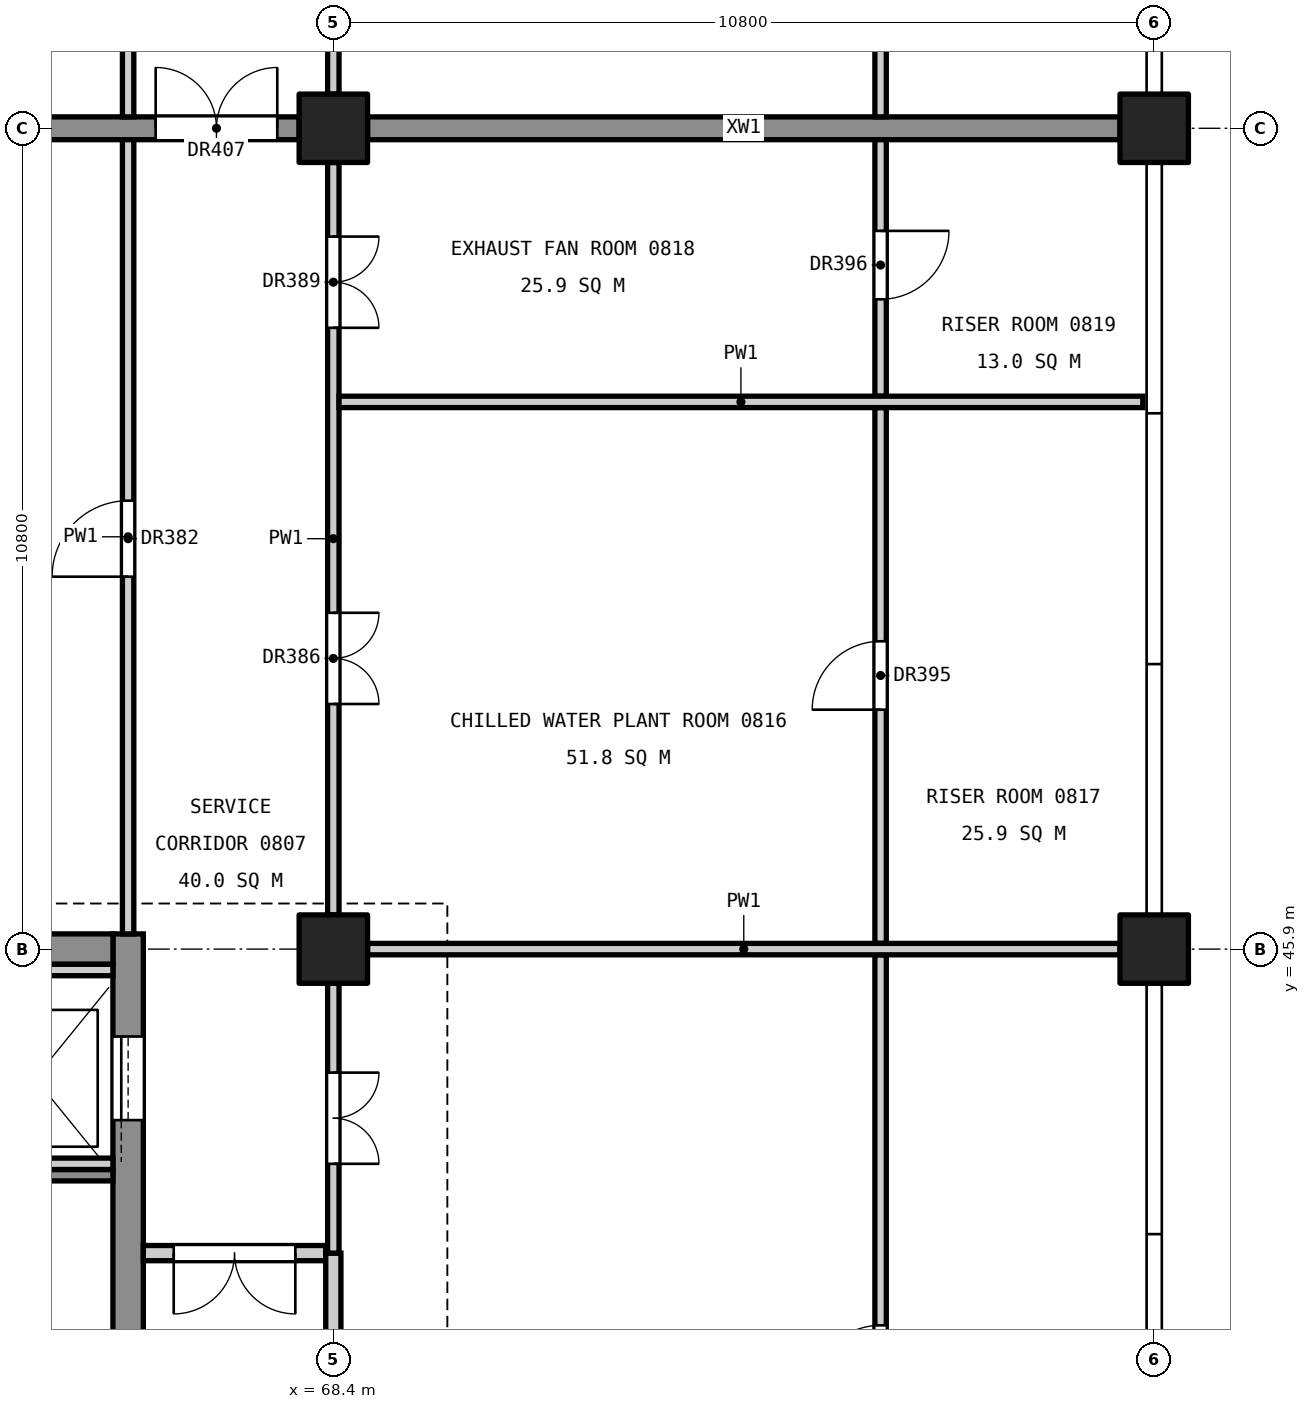
"""IFC4 building model, lengths in metres.
Left out: names, types, materials, properties, quantities, classifications, styles, units other than length and angle.
Written with IfcOpenShell. Run it as: python <this file> out.ifc"""

import sys

from ifc_helpers import new_model, si_unit, direction, frame, frame_2d, origin, origin_2d, place, context, subcontext, project, spatial, rectangle, extrude, element, fill, save


model = new_model("IFC4")
c1 = context("Model", 3, precision=1e-05, world=origin(), true_north=direction((0.0, 1.0)))
c2 = subcontext(c1, "Body", "Model", "MODEL_VIEW")
j1 = project(units=[si_unit("LENGTHUNIT", "METRE"), si_unit("PLANEANGLEUNIT", "RADIAN")], contexts=[c1])
p1 = place(None, origin())
s1 = spatial("IfcSite", under=j1, at=p1, CompositionType="ELEMENT")
p2 = place(p1, origin())
s2 = spatial("IfcBuilding", under=s1, at=p2, CompositionType="ELEMENT")
p3 = place(p2, frame((0.0, 0.0, 41.4)))
s3 = spatial("IfcBuildingStorey", under=s2, at=p3, CompositionType="ELEMENT", Elevation=41.4)
for number, where, z_axis, x_axis in (
    (1, (68.4, 45.9, 0.0), (0.0, 0.0, 1.0), (1.0, 0.0, 0.0)),
    (2, (68.4, 56.7, 0.0), (0.0, 0.0, 1.0), (1.0, 0.0, 0.0)),
    (3, (79.2, 45.9, 0.0), (0.0, 0.0, 1.0), (1.0, 0.0, 0.0)),
    (4, (79.2, 56.7, 0.0), (0.0, 0.0, 1.0), (1.0, 0.0, 0.0)),
):
    element("IfcColumn", number, at=place(p3, frame(where, z_axis=z_axis, x_axis=x_axis)), inside=s3, PredefinedType="COLUMN", context=c2, shape_type="SweptSolid", body=[
        extrude(rectangle(XDim=0.9, YDim=0.9, at=origin_2d()), origin(), (0.0, 0.0, 1.0), 4.8),
    ])
p4 = place(p3, frame((65.7, 34.9, 0.0), z_axis=(0.0, 0.0, 1.0), x_axis=(0.0, 1.0, 0.0)))
e5 = element("IfcWall", 5, at=p4, inside=s3, PredefinedType="SHEAR", context=c2, shape_type="SweptSolid", body=[
    extrude(rectangle(XDim=11.2, YDim=0.4, at=frame_2d((5.6, 0.0))), origin(), (0.0, 0.0, 1.0), 4.55),
])
p5 = place(p4, frame((0.5, 0.0, 0.0)))
e6 = element("IfcOpeningElement", 6, at=p5, cuts=e5, PredefinedType="OPENING", context=c2, shape_type="SweptSolid", body=[
    extrude(rectangle(XDim=1.4, YDim=2.1, at=frame_2d((0.7, 1.05))), frame((0.0, 0.21, 0.0), z_axis=(0.0, -1.0, 0.0), x_axis=(1.0, 0.0, 0.0)), (0.0, 0.0, 1.0), 0.42),
])
p6 = place(p4, frame((8.75, 0.0, 0.0)))
e7 = element("IfcOpeningElement", 7, at=p6, cuts=e5, PredefinedType="OPENING", context=c2, shape_type="SweptSolid", body=[
    extrude(rectangle(XDim=1.1, YDim=2.1, at=frame_2d((0.55, 1.05))), frame((0.0, 0.21, 0.0), z_axis=(0.0, -1.0, 0.0), x_axis=(1.0, 0.0, 0.0)), (0.0, 0.0, 1.0), 0.42),
])
p7 = place(p3, frame((61.4, 45.9, 0.0), z_axis=(0.0, 0.0, 1.0), x_axis=(1.0, 0.0, 0.0)))
e8 = element("IfcWall", 8, at=p7, inside=s3, PredefinedType="SHEAR", context=c2, shape_type="SweptSolid", body=[
    extrude(rectangle(XDim=4.1, YDim=0.4, at=frame_2d((2.05, 0.0))), origin(), (0.0, 0.0, 1.0), 4.55),
])
p8 = place(p3, frame((61.65, 56.7, 0.0), z_axis=(0.0, 0.0, 1.0), x_axis=(1.0, 0.0, 0.0)))
e9 = element("IfcWall", 9, at=p8, inside=s3, PredefinedType="SHEAR", context=c2, shape_type="SweptSolid", body=[
    extrude(rectangle(XDim=6.3, YDim=0.3, at=frame_2d((3.15, 0.0))), origin(), (0.0, 0.0, 1.0), 4.55),
])
p9 = place(p8, frame((4.413, 0.0, 0.0)))
e10 = element("IfcOpeningElement", 10, at=p9, cuts=e9, PredefinedType="OPENING", context=c2, shape_type="SweptSolid", body=[
    extrude(rectangle(XDim=1.6, YDim=2.1, at=frame_2d((0.8, 1.05))), frame((0.0, 0.16, 0.0), z_axis=(0.0, -1.0, 0.0), x_axis=(1.0, 0.0, 0.0)), (0.0, 0.0, 1.0), 0.32),
])
p10 = place(p3, frame((68.85, 56.7, 0.0), z_axis=(0.0, 0.0, 1.0), x_axis=(1.0, 0.0, 0.0)))
e11 = element("IfcWall", 11, at=p10, inside=s3, PredefinedType="SHEAR", context=c2, shape_type="SweptSolid", body=[
    extrude(rectangle(XDim=9.9, YDim=0.3, at=frame_2d((4.95, 0.0))), origin(), (0.0, 0.0, 1.0), 4.55),
])
p11 = place(p3, frame((61.4, 42.925, 0.0), z_axis=(0.0, 0.0, 1.0), x_axis=(1.0, 0.0, 0.0)))
e12 = element("IfcWall", 12, at=p11, inside=s3, PredefinedType="SOLIDWALL", context=c2, shape_type="SweptSolid", body=[
    extrude(rectangle(XDim=4.1, YDim=0.15, at=frame_2d((2.05, 0.0))), origin(), (0.0, 0.0, 1.0), 4.55),
])
for number, where, z_axis, x_axis in (
    (13, (63.65, 43.075, 0.0), (0.0, 0.0, 1.0), (1.0, 0.0, 0.0)),
    (14, (63.65, 45.625, 0.0), (0.0, 0.0, 1.0), (1.0, 0.0, 0.0)),
):
    element("IfcWall", number, at=place(p3, frame(where, z_axis=z_axis, x_axis=x_axis)), inside=s3, PredefinedType="SOLIDWALL", context=c2, shape_type="SweptSolid", body=[
        extrude(rectangle(XDim=1.85, YDim=0.15, at=frame_2d((0.925, 0.0))), origin(), (0.0, 0.0, 1.0), 4.8),
    ])
p12 = place(p3, frame((65.7, 46.1, 0.0), z_axis=(0.0, 0.0, 1.0), x_axis=(0.0, 1.0, 0.0)))
e15 = element("IfcWall", 15, at=p12, inside=s3, PredefinedType="PARTITIONING", context=c2, shape_type="SweptSolid", body=[
    extrude(rectangle(XDim=10.45, YDim=0.15, at=frame_2d((5.225, 0.0))), origin(), (0.0, 0.0, 1.0), 3.55),
])
p13 = place(p12, frame((4.7, 0.0, 0.0)))
e16 = element("IfcOpeningElement", 16, at=p13, cuts=e15, PredefinedType="OPENING", context=c2, shape_type="SweptSolid", body=[
    extrude(rectangle(XDim=1.0, YDim=2.1, at=frame_2d((0.5, 1.05))), frame((0.0, 0.085, 0.0), z_axis=(0.0, -1.0, 0.0), x_axis=(1.0, 0.0, 0.0)), (0.0, 0.0, 1.0), 0.17),
])
p14 = place(p3, frame((65.7, 56.85, 0.0), z_axis=(0.0, 0.0, 1.0), x_axis=(0.0, 1.0, 0.0)))
e17 = element("IfcWall", 17, at=p14, inside=s3, PredefinedType="PARTITIONING", context=c2, shape_type="SweptSolid", body=[
    extrude(rectangle(XDim=3.25, YDim=0.15, at=frame_2d((1.625, 0.0))), origin(), (0.0, 0.0, 1.0), 3.55),
])
p15 = place(p14, frame((1.15, 0.0, 0.0)))
e18 = element("IfcOpeningElement", 18, at=p15, cuts=e17, PredefinedType="OPENING", context=c2, shape_type="SweptSolid", body=[
    extrude(rectangle(XDim=1.0, YDim=2.1, at=frame_2d((0.5, 1.05))), frame((0.0, 0.085, 0.0), z_axis=(0.0, -1.0, 0.0), x_axis=(1.0, 0.0, 0.0)), (0.0, 0.0, 1.0), 0.17),
])
p16 = place(p3, frame((65.9, 41.9, 0.0), z_axis=(0.0, 0.0, 1.0), x_axis=(1.0, 0.0, 0.0)))
e19 = element("IfcWall", 19, at=p16, inside=s3, PredefinedType="PARTITIONING", context=c2, shape_type="SweptSolid", body=[
    extrude(rectangle(XDim=2.4, YDim=0.2, at=frame_2d((1.2, 0.0))), origin(), (0.0, 0.0, 1.0), 3.55),
])
p17 = place(p16, frame((0.4, 0.0, 0.0)))
e20 = element("IfcOpeningElement", 20, at=p17, cuts=e19, PredefinedType="OPENING", context=c2, shape_type="SweptSolid", body=[
    extrude(rectangle(XDim=1.6, YDim=2.1, at=frame_2d((0.8, 1.05))), frame((0.0, 0.11, 0.0), z_axis=(0.0, -1.0, 0.0), x_axis=(1.0, 0.0, 0.0)), (0.0, 0.0, 1.0), 0.22),
])
p18 = place(p3, frame((68.4, 35.55, 0.0), z_axis=(0.0, 0.0, 1.0), x_axis=(0.0, 1.0, 0.0)))
e21 = element("IfcWall", 21, at=p18, inside=s3, PredefinedType="PARTITIONING", context=c2, shape_type="SweptSolid", body=[
    extrude(rectangle(XDim=6.35, YDim=0.2, at=frame_2d((3.175, 0.0))), origin(), (0.0, 0.0, 1.0), 3.55),
])
p19 = place(p3, frame((68.4, 41.9, 0.0), z_axis=(0.0, 0.0, 1.0), x_axis=(0.0, 1.0, 0.0)))
e22 = element("IfcWall", 22, at=p19, inside=s3, PredefinedType="PARTITIONING", context=c2, shape_type="SweptSolid", body=[
    extrude(rectangle(XDim=3.55, YDim=0.15, at=frame_2d((1.775, 0.0))), origin(), (0.0, 0.0, 1.0), 3.55),
])
p20 = place(p19, frame((1.175, 0.0, 0.0)))
e23 = element("IfcOpeningElement", 23, at=p20, cuts=e22, PredefinedType="OPENING", context=c2, shape_type="SweptSolid", body=[
    extrude(rectangle(XDim=1.2, YDim=2.1, at=frame_2d((0.6, 1.05))), frame((0.0, 0.085, 0.0), z_axis=(0.0, -1.0, 0.0), x_axis=(1.0, 0.0, 0.0)), (0.0, 0.0, 1.0), 0.17),
])
p21 = place(p3, frame((68.4, 46.35, 0.0), z_axis=(0.0, 0.0, 1.0), x_axis=(0.0, 1.0, 0.0)))
e24 = element("IfcWall", 24, at=p21, inside=s3, PredefinedType="PARTITIONING", context=c2, shape_type="SweptSolid", body=[
    extrude(rectangle(XDim=9.9, YDim=0.15, at=frame_2d((4.95, 0.0))), origin(), (0.0, 0.0, 1.0), 3.55),
])
p22 = place(p21, frame((2.775, 0.0, 0.0)))
e25 = element("IfcOpeningElement", 25, at=p22, cuts=e24, PredefinedType="OPENING", context=c2, shape_type="SweptSolid", body=[
    extrude(rectangle(XDim=1.2, YDim=2.1, at=frame_2d((0.6, 1.05))), frame((0.0, 0.085, 0.0), z_axis=(0.0, -1.0, 0.0), x_axis=(1.0, 0.0, 0.0)), (0.0, 0.0, 1.0), 0.17),
])
p23 = place(p21, frame((7.725, 0.0, 0.0)))
e26 = element("IfcOpeningElement", 26, at=p23, cuts=e24, PredefinedType="OPENING", context=c2, shape_type="SweptSolid", body=[
    extrude(rectangle(XDim=1.2, YDim=2.1, at=frame_2d((0.6, 1.05))), frame((0.0, 0.085, 0.0), z_axis=(0.0, -1.0, 0.0), x_axis=(1.0, 0.0, 0.0)), (0.0, 0.0, 1.0), 0.17),
])
p24 = place(p3, frame((68.4, 57.15, 0.0), z_axis=(0.0, 0.0, 1.0), x_axis=(0.0, 1.0, 0.0)))
e27 = element("IfcWall", 27, at=p24, inside=s3, PredefinedType="PARTITIONING", context=c2, shape_type="SweptSolid", body=[
    extrude(rectangle(XDim=3.15, YDim=0.15, at=frame_2d((1.575, 0.0))), origin(), (0.0, 0.0, 1.0), 3.55),
])
p25 = place(p24, frame((0.975, 0.0, 0.0)))
e28 = element("IfcOpeningElement", 28, at=p25, cuts=e27, PredefinedType="OPENING", context=c2, shape_type="SweptSolid", body=[
    extrude(rectangle(XDim=1.2, YDim=2.1, at=frame_2d((0.6, 1.05))), frame((0.0, 0.085, 0.0), z_axis=(0.0, -1.0, 0.0), x_axis=(1.0, 0.0, 0.0)), (0.0, 0.0, 1.0), 0.17),
])
p26 = place(p3, frame((75.6, 35.25, 0.0), z_axis=(0.0, 0.0, 1.0), x_axis=(0.0, 1.0, 0.0)))
e29 = element("IfcWall", 29, at=p26, inside=s3, PredefinedType="PARTITIONING", context=c2, shape_type="SweptSolid", body=[
    extrude(rectangle(XDim=10.575, YDim=0.15, at=frame_2d((5.288, 0.0))), origin(), (0.0, 0.0, 1.0), 3.55),
])
p27 = place(p26, frame((4.8, 0.0, 0.0)))
e30 = element("IfcOpeningElement", 30, at=p27, cuts=e29, PredefinedType="OPENING", context=c2, shape_type="SweptSolid", body=[
    extrude(rectangle(XDim=0.9, YDim=2.1, at=frame_2d((0.45, 1.05))), frame((0.0, 0.085, 0.0), z_axis=(0.0, -1.0, 0.0), x_axis=(1.0, 0.0, 0.0)), (0.0, 0.0, 1.0), 0.17),
])
p28 = place(p3, frame((75.6, 45.975, 0.0), z_axis=(0.0, 0.0, 1.0), x_axis=(0.0, 1.0, 0.0)))
e31 = element("IfcWall", 31, at=p28, inside=s3, PredefinedType="PARTITIONING", context=c2, shape_type="SweptSolid", body=[
    extrude(rectangle(XDim=7.05, YDim=0.15, at=frame_2d((3.525, 0.0))), origin(), (0.0, 0.0, 1.0), 3.55),
])
p29 = place(p28, frame((3.075, 0.0, 0.0)))
e32 = element("IfcOpeningElement", 32, at=p29, cuts=e31, PredefinedType="OPENING", context=c2, shape_type="SweptSolid", body=[
    extrude(rectangle(XDim=0.9, YDim=2.1, at=frame_2d((0.45, 1.05))), frame((0.0, 0.085, 0.0), z_axis=(0.0, -1.0, 0.0), x_axis=(1.0, 0.0, 0.0)), (0.0, 0.0, 1.0), 0.17),
])
p30 = place(p3, frame((75.6, 53.175, 0.0), z_axis=(0.0, 0.0, 1.0), x_axis=(0.0, 1.0, 0.0)))
e33 = element("IfcWall", 33, at=p30, inside=s3, PredefinedType="PARTITIONING", context=c2, shape_type="SweptSolid", body=[
    extrude(rectangle(XDim=3.375, YDim=0.15, at=frame_2d((1.688, 0.0))), origin(), (0.0, 0.0, 1.0), 3.55),
])
p31 = place(p30, frame((1.275, 0.0, 0.0)))
e34 = element("IfcOpeningElement", 34, at=p31, cuts=e33, PredefinedType="OPENING", context=c2, shape_type="SweptSolid", body=[
    extrude(rectangle(XDim=0.9, YDim=2.1, at=frame_2d((0.45, 1.05))), frame((0.0, 0.085, 0.0), z_axis=(0.0, -1.0, 0.0), x_axis=(1.0, 0.0, 0.0)), (0.0, 0.0, 1.0), 0.17),
])
p32 = place(p3, frame((75.6, 56.85, 0.0), z_axis=(0.0, 0.0, 1.0), x_axis=(0.0, 1.0, 0.0)))
e35 = element("IfcWall", 35, at=p32, inside=s3, PredefinedType="PARTITIONING", context=c2, shape_type="SweptSolid", body=[
    extrude(rectangle(XDim=14.175, YDim=0.15, at=frame_2d((7.087, 0.0))), origin(), (0.0, 0.0, 1.0), 3.55),
])
p33 = place(p32, frame((6.6, 0.0, 0.0)))
e36 = element("IfcOpeningElement", 36, at=p33, cuts=e35, PredefinedType="OPENING", context=c2, shape_type="SweptSolid", body=[
    extrude(rectangle(XDim=0.9, YDim=2.1, at=frame_2d((0.45, 1.05))), frame((0.0, 0.085, 0.0), z_axis=(0.0, -1.0, 0.0), x_axis=(1.0, 0.0, 0.0)), (0.0, 0.0, 1.0), 0.17),
])
p34 = place(p3, frame((68.85, 45.9, 0.0), z_axis=(0.0, 0.0, 1.0), x_axis=(1.0, 0.0, 0.0)))
e37 = element("IfcWall", 37, at=p34, inside=s3, PredefinedType="PARTITIONING", context=c2, shape_type="SweptSolid", body=[
    extrude(rectangle(XDim=9.9, YDim=0.15, at=frame_2d((4.95, 0.0))), origin(), (0.0, 0.0, 1.0), 3.85),
])
p35 = place(p3, frame((68.475, 53.1, 0.0), z_axis=(0.0, 0.0, 1.0), x_axis=(1.0, 0.0, 0.0)))
e38 = element("IfcWall", 38, at=p35, inside=s3, PredefinedType="PARTITIONING", context=c2, shape_type="SweptSolid", body=[
    extrude(rectangle(XDim=10.575, YDim=0.15, at=frame_2d((5.288, 0.0))), origin(), (0.0, 0.0, 1.0), 3.85),
])
p36 = place(p6, origin())
e39 = element("IfcDoor", 39, at=p36, inside=s3, OperationType="SLIDING_TO_LEFT", PredefinedType="DOOR", context=c2, shape_type="SweptSolid", body=[
    extrude(rectangle(XDim=1.1, YDim=2.1, at=frame_2d((0.55, 1.05))), frame((0.0, 0.025, 0.0), z_axis=(0.0, -1.0, 0.0), x_axis=(1.0, 0.0, 0.0)), (0.0, 0.0, 1.0), 0.05),
])
fill(e7, e39)
p37 = place(p13, origin())
e40 = element("IfcDoor", 40, at=p37, inside=s3, OperationType="SINGLE_SWING_LEFT", PredefinedType="DOOR", context=c2, shape_type="SweptSolid", body=[
    extrude(rectangle(XDim=1.0, YDim=2.1, at=frame_2d((0.5, 1.05))), frame((0.0, 0.025, 0.0), z_axis=(0.0, -1.0, 0.0), x_axis=(1.0, 0.0, 0.0)), (0.0, 0.0, 1.0), 0.05),
])
fill(e16, e40)
p38 = place(p20, frame((1.2, 0.0, 0.0), z_axis=(0.0, 0.0, 1.0), x_axis=(-1.0, 0.0, 0.0)))
e41 = element("IfcDoor", 41, at=p38, inside=s3, OperationType="DOUBLE_DOOR_SINGLE_SWING", PredefinedType="DOOR", context=c2, shape_type="SweptSolid", body=[
    extrude(rectangle(XDim=1.2, YDim=2.1, at=frame_2d((0.6, 1.05))), frame((0.0, 0.025, 0.0), z_axis=(0.0, -1.0, 0.0), x_axis=(1.0, 0.0, 0.0)), (0.0, 0.0, 1.0), 0.05),
])
fill(e23, e41)
p39 = place(p22, frame((1.2, 0.0, 0.0), z_axis=(0.0, 0.0, 1.0), x_axis=(-1.0, 0.0, 0.0)))
e42 = element("IfcDoor", 42, at=p39, inside=s3, OperationType="DOUBLE_DOOR_SINGLE_SWING", PredefinedType="DOOR", context=c2, shape_type="SweptSolid", body=[
    extrude(rectangle(XDim=1.2, YDim=2.1, at=frame_2d((0.6, 1.05))), frame((0.0, 0.025, 0.0), z_axis=(0.0, -1.0, 0.0), x_axis=(1.0, 0.0, 0.0)), (0.0, 0.0, 1.0), 0.05),
])
fill(e25, e42)
p40 = place(p23, frame((1.2, 0.0, 0.0), z_axis=(0.0, 0.0, 1.0), x_axis=(-1.0, 0.0, 0.0)))
e43 = element("IfcDoor", 43, at=p40, inside=s3, OperationType="DOUBLE_DOOR_SINGLE_SWING", PredefinedType="DOOR", context=c2, shape_type="SweptSolid", body=[
    extrude(rectangle(XDim=1.2, YDim=2.1, at=frame_2d((0.6, 1.05))), frame((0.0, 0.025, 0.0), z_axis=(0.0, -1.0, 0.0), x_axis=(1.0, 0.0, 0.0)), (0.0, 0.0, 1.0), 0.05),
])
fill(e26, e43)
p41 = place(p27, origin())
e44 = element("IfcDoor", 44, at=p41, inside=s3, OperationType="SINGLE_SWING_LEFT", PredefinedType="DOOR", context=c2, shape_type="SweptSolid", body=[
    extrude(rectangle(XDim=0.9, YDim=2.1, at=frame_2d((0.45, 1.05))), frame((0.0, 0.025, 0.0), z_axis=(0.0, -1.0, 0.0), x_axis=(1.0, 0.0, 0.0)), (0.0, 0.0, 1.0), 0.05),
])
fill(e30, e44)
p42 = place(p29, origin())
e45 = element("IfcDoor", 45, at=p42, inside=s3, OperationType="SINGLE_SWING_LEFT", PredefinedType="DOOR", context=c2, shape_type="SweptSolid", body=[
    extrude(rectangle(XDim=0.9, YDim=2.1, at=frame_2d((0.45, 1.05))), frame((0.0, 0.025, 0.0), z_axis=(0.0, -1.0, 0.0), x_axis=(1.0, 0.0, 0.0)), (0.0, 0.0, 1.0), 0.05),
])
fill(e32, e45)
p43 = place(p31, frame((0.9, 0.0, 0.0), z_axis=(0.0, 0.0, 1.0), x_axis=(-1.0, 0.0, 0.0)))
e46 = element("IfcDoor", 46, at=p43, inside=s3, OperationType="SINGLE_SWING_LEFT", PredefinedType="DOOR", context=c2, shape_type="SweptSolid", body=[
    extrude(rectangle(XDim=0.9, YDim=2.1, at=frame_2d((0.45, 1.05))), frame((0.0, 0.025, 0.0), z_axis=(0.0, -1.0, 0.0), x_axis=(1.0, 0.0, 0.0)), (0.0, 0.0, 1.0), 0.05),
])
fill(e34, e46)
p44 = place(p17, frame((1.6, 0.0, 0.0), z_axis=(0.0, 0.0, 1.0), x_axis=(-1.0, 0.0, 0.0)))
e47 = element("IfcDoor", 47, at=p44, inside=s3, OperationType="DOUBLE_DOOR_SINGLE_SWING", PredefinedType="DOOR", context=c2, shape_type="SweptSolid", body=[
    extrude(rectangle(XDim=1.6, YDim=2.1, at=frame_2d((0.8, 1.05))), frame((0.0, 0.025, 0.0), z_axis=(0.0, -1.0, 0.0), x_axis=(1.0, 0.0, 0.0)), (0.0, 0.0, 1.0), 0.05),
])
fill(e20, e47)
p45 = place(p9, origin())
e48 = element("IfcDoor", 48, at=p45, inside=s3, OperationType="DOUBLE_DOOR_SINGLE_SWING", PredefinedType="DOOR", context=c2, shape_type="SweptSolid", body=[
    extrude(rectangle(XDim=1.6, YDim=2.1, at=frame_2d((0.8, 1.05))), frame((0.0, 0.025, 0.0), z_axis=(0.0, -1.0, 0.0), x_axis=(1.0, 0.0, 0.0)), (0.0, 0.0, 1.0), 0.05),
])
fill(e10, e48)
save(model, sys.argv[1])
